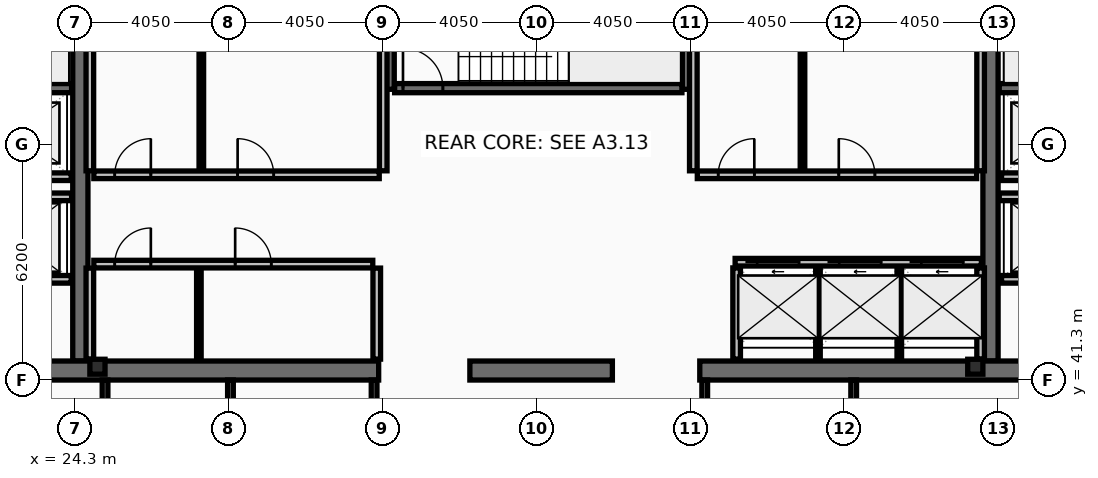
"""IFC4 building model, lengths in metres.
Left out: names, types, materials, properties, quantities, classifications, styles, units other than length and angle.
Written with IfcOpenShell. Run it as: python <this file> out.ifc"""

import sys

from ifc_helpers import new_model, si_unit, direction, frame, frame_2d, origin, origin_2d, place, context, subcontext, project, spatial, rectangle, i_section, extrude, element, fill, save


model = new_model("IFC4")
c1 = context("Model", 3, precision=1e-05, world=origin(), true_north=direction((0.0, 1.0)))
c2 = subcontext(c1, "Body", "Model", "MODEL_VIEW")
j1 = project(units=[si_unit("LENGTHUNIT", "METRE"), si_unit("PLANEANGLEUNIT", "RADIAN")], contexts=[c1])
p1 = place(None, origin())
s1 = spatial("IfcSite", under=j1, at=p1, CompositionType="ELEMENT")
p2 = place(p1, origin())
s2 = spatial("IfcBuilding", under=s1, at=p2, CompositionType="ELEMENT")
p3 = place(p2, frame((0.0, 0.0, 273.4)))
s3 = spatial("IfcBuildingStorey", under=s2, at=p3, CompositionType="ELEMENT", Elevation=273.4)
for number, where, z_axis, x_axis in (
    (1, (24.45, 41.8, 0.0), (0.0, 0.0, 1.0), (0.0, 1.0, 0.0)),
    (2, (48.4, 41.8, 0.0), (0.0, 0.0, 1.0), (0.0, 1.0, 0.0)),
):
    element("IfcWall", number, at=place(p3, frame(where, z_axis=z_axis, x_axis=x_axis)), inside=s3, PredefinedType="SHEAR", context=c2, shape_type="SweptSolid", body=[
        extrude(rectangle(XDim=11.4, YDim=0.4, at=frame_2d((5.7, 0.0))), origin(), (0.0, 0.0, 1.0), 3.44),
    ])
p4 = place(p3, frame((32.3, 41.55, 0.0), z_axis=(0.0, 0.0, 1.0), x_axis=(-1.0, 0.0, 0.0)))
e3 = element("IfcWall", 3, at=p4, inside=s3, PredefinedType="SHEAR", context=c2, shape_type="SweptSolid", body=[
    extrude(rectangle(XDim=11.45, YDim=0.5, at=frame_2d((5.725, 0.0))), origin(), (0.0, 0.0, 1.0), 3.44),
])
p5 = place(p3, frame((38.45, 41.55, 0.0), z_axis=(0.0, 0.0, 1.0), x_axis=(-1.0, 0.0, 0.0)))
e4 = element("IfcWall", 4, at=p5, inside=s3, PredefinedType="SHEAR", context=c2, shape_type="SweptSolid", body=[
    extrude(rectangle(XDim=3.75, YDim=0.5, at=frame_2d((1.875, 0.0))), origin(), (0.0, 0.0, 1.0), 3.44),
])
p6 = place(p3, frame((52.05, 41.55, 0.0), z_axis=(0.0, 0.0, 1.0), x_axis=(-1.0, 0.0, 0.0)))
e5 = element("IfcWall", 5, at=p6, inside=s3, PredefinedType="SHEAR", context=c2, shape_type="SweptSolid", body=[
    extrude(rectangle(XDim=11.3, YDim=0.5, at=frame_2d((5.65, 0.0))), origin(), (0.0, 0.0, 1.0), 3.44),
])
for number, where, z_axis, x_axis in (
    (6, (32.58, 48.95, 0.0), (0.0, 0.0, 1.0), (0.0, 1.0, 0.0)),
    (7, (40.42, 48.95, 0.0), (0.0, 0.0, 1.0), (0.0, 1.0, 0.0)),
):
    element("IfcWall", number, at=place(p3, frame(where, z_axis=z_axis, x_axis=x_axis)), inside=s3, PredefinedType="SHEAR", context=c2, shape_type="SweptSolid", body=[
        extrude(rectangle(XDim=4.25, YDim=0.26, at=frame_2d((2.125, 0.0))), origin(), (0.0, 0.0, 1.0), 3.44),
    ])
p7 = place(p3, frame((16.7, 48.98, 0.0), z_axis=(0.0, 0.0, 1.0), x_axis=(1.0, 0.0, 0.0)))
e8 = element("IfcWall", 8, at=p7, inside=s3, PredefinedType="SHEAR", context=c2, shape_type="SweptSolid", body=[
    extrude(rectangle(XDim=7.52, YDim=0.24, at=frame_2d((3.76, 0.0))), origin(), (0.0, 0.0, 1.0), 3.44),
])
p8 = place(p7, frame((0.22, 0.0, 0.0)))
e9 = element("IfcOpeningElement", 9, at=p8, cuts=e8, PredefinedType="OPENING", context=c2, shape_type="SweptSolid", body=[
    extrude(rectangle(XDim=1.05, YDim=2.15, at=frame_2d((0.525, 1.075))), frame((0.0, 0.13, 0.0), z_axis=(0.0, -1.0, 0.0), x_axis=(1.0, 0.0, 0.0)), (0.0, 0.0, 1.0), 0.26),
])
p9 = place(p3, frame((48.63, 48.98, 0.0), z_axis=(0.0, 0.0, 1.0), x_axis=(1.0, 0.0, 0.0)))
e10 = element("IfcWall", 10, at=p9, inside=s3, PredefinedType="SHEAR", context=c2, shape_type="SweptSolid", body=[
    extrude(rectangle(XDim=7.57, YDim=0.24, at=frame_2d((3.785, 0.0))), origin(), (0.0, 0.0, 1.0), 3.44),
])
p10 = place(p9, frame((6.3, 0.0, 0.0)))
e11 = element("IfcOpeningElement", 11, at=p10, cuts=e10, PredefinedType="OPENING", context=c2, shape_type="SweptSolid", body=[
    extrude(rectangle(XDim=1.05, YDim=2.15, at=frame_2d((0.525, 1.075))), frame((0.0, 0.13, 0.0), z_axis=(0.0, -1.0, 0.0), x_axis=(1.0, 0.0, 0.0)), (0.0, 0.0, 1.0), 0.26),
])
p11 = place(p3, frame((32.72, 48.98, 0.0), z_axis=(0.0, 0.0, 1.0), x_axis=(1.0, 0.0, 0.0)))
e12 = element("IfcWall", 12, at=p11, inside=s3, PredefinedType="SHEAR", context=c2, shape_type="SweptSolid", body=[
    extrude(rectangle(XDim=7.56, YDim=0.24, at=frame_2d((3.78, 0.0))), origin(), (0.0, 0.0, 1.0), 3.44),
])
p12 = place(p11, frame((0.22, 0.0, 0.0)))
e13 = element("IfcOpeningElement", 13, at=p12, cuts=e12, PredefinedType="OPENING", context=c2, shape_type="SweptSolid", body=[
    extrude(rectangle(XDim=1.05, YDim=2.15, at=frame_2d((0.525, 1.075))), frame((0.0, 0.13, 0.0), z_axis=(0.0, -1.0, 0.0), x_axis=(1.0, 0.0, 0.0)), (0.0, 0.0, 1.0), 0.26),
])
for number, where, z_axis, x_axis in (
    (14, (24.9, 41.65, 0.0), (0.0, 0.0, 1.0), (1.0, 0.0, 0.0)),
    (15, (48.0, 41.65, 0.0), (0.0, 0.0, 1.0), (1.0, 0.0, 0.0)),
):
    element("IfcColumn", number, at=place(p3, frame(where, z_axis=z_axis, x_axis=x_axis)), inside=s3, PredefinedType="COLUMN", context=c2, shape_type="SweptSolid", body=[
        extrude(i_section(OverallWidth=0.399, OverallDepth=0.393, WebThickness=0.023, FlangeThickness=0.037, at=origin_2d()), origin(), (0.0, 0.0, 1.0), 3.6),
    ])
p13 = place(p3, frame((41.68, 44.4, 0.0), z_axis=(0.0, 0.0, 1.0), x_axis=(1.0, 0.0, 0.0)))
e16 = element("IfcWall", 16, at=p13, inside=s3, PredefinedType="PARTITIONING", context=c2, shape_type="SweptSolid", body=[
    extrude(rectangle(XDim=6.48, YDim=0.2, at=frame_2d((3.24, 0.0))), origin(), (0.0, 0.0, 1.0), 3.44),
])
p14 = place(p13, frame((0.58, 0.0, 0.0)))
e17 = element("IfcOpeningElement", 17, at=p14, cuts=e16, PredefinedType="OPENING", context=c2, shape_type="SweptSolid", body=[
    extrude(rectangle(XDim=1.1, YDim=2.18, at=frame_2d((0.55, 1.09))), frame((0.0, 0.11, 0.0), z_axis=(0.0, -1.0, 0.0), x_axis=(1.0, 0.0, 0.0)), (0.0, 0.0, 1.0), 0.22),
])
p15 = place(p13, frame((2.74, 0.0, 0.0)))
e18 = element("IfcOpeningElement", 18, at=p15, cuts=e16, PredefinedType="OPENING", context=c2, shape_type="SweptSolid", body=[
    extrude(rectangle(XDim=1.1, YDim=2.18, at=frame_2d((0.55, 1.09))), frame((0.0, 0.11, 0.0), z_axis=(0.0, -1.0, 0.0), x_axis=(1.0, 0.0, 0.0)), (0.0, 0.0, 1.0), 0.22),
])
p16 = place(p13, frame((4.9, 0.0, 0.0)))
e19 = element("IfcOpeningElement", 19, at=p16, cuts=e16, PredefinedType="OPENING", context=c2, shape_type="SweptSolid", body=[
    extrude(rectangle(XDim=1.1, YDim=2.18, at=frame_2d((0.55, 1.09))), frame((0.0, 0.11, 0.0), z_axis=(0.0, -1.0, 0.0), x_axis=(1.0, 0.0, 0.0)), (0.0, 0.0, 1.0), 0.22),
])
p17 = place(p3, frame((51.61, 43.95, 0.0), z_axis=(0.0, 0.0, 1.0), x_axis=(-1.0, 0.0, 0.0)))
e20 = element("IfcWall", 20, at=p17, inside=s3, PredefinedType="PARTITIONING", context=c2, shape_type="SweptSolid", body=[
    extrude(rectangle(XDim=2.92, YDim=0.2, at=frame_2d((1.46, 0.0))), origin(), (0.0, 0.0, 1.0), 3.44),
])
p18 = place(p17, frame((0.81, 0.0, 0.0)))
e21 = element("IfcOpeningElement", 21, at=p18, cuts=e20, PredefinedType="OPENING", context=c2, shape_type="SweptSolid", body=[
    extrude(rectangle(XDim=1.3, YDim=2.18, at=frame_2d((0.65, 1.09))), frame((0.0, 0.11, 0.0), z_axis=(0.0, -1.0, 0.0), x_axis=(1.0, 0.0, 0.0)), (0.0, 0.0, 1.0), 0.22),
])
p19 = place(p3, frame((24.21, 43.95, 0.0), z_axis=(0.0, 0.0, 1.0), x_axis=(-1.0, 0.0, 0.0)))
e22 = element("IfcWall", 22, at=p19, inside=s3, PredefinedType="PARTITIONING", context=c2, shape_type="SweptSolid", body=[
    extrude(rectangle(XDim=2.97, YDim=0.2, at=frame_2d((1.485, 0.0))), origin(), (0.0, 0.0, 1.0), 3.44),
])
p20 = place(p19, frame((0.86, 0.0, 0.0)))
e23 = element("IfcOpeningElement", 23, at=p20, cuts=e22, PredefinedType="OPENING", context=c2, shape_type="SweptSolid", body=[
    extrude(rectangle(XDim=1.3, YDim=2.18, at=frame_2d((0.65, 1.09))), frame((0.0, 0.11, 0.0), z_axis=(0.0, -1.0, 0.0), x_axis=(1.0, 0.0, 0.0)), (0.0, 0.0, 1.0), 0.22),
])
p21 = place(p3, frame((51.61, 46.65, 0.0), z_axis=(0.0, 0.0, 1.0), x_axis=(-1.0, 0.0, 0.0)))
e24 = element("IfcWall", 24, at=p21, inside=s3, PredefinedType="PARTITIONING", context=c2, shape_type="SweptSolid", body=[
    extrude(rectangle(XDim=2.92, YDim=0.2, at=frame_2d((1.46, 0.0))), origin(), (0.0, 0.0, 1.0), 3.44),
])
p22 = place(p21, frame((0.86, 0.0, 0.0)))
e25 = element("IfcOpeningElement", 25, at=p22, cuts=e24, PredefinedType="OPENING", context=c2, shape_type="SweptSolid", body=[
    extrude(rectangle(XDim=1.2, YDim=2.18, at=frame_2d((0.6, 1.09))), frame((0.0, 0.11, 0.0), z_axis=(0.0, -1.0, 0.0), x_axis=(1.0, 0.0, 0.0)), (0.0, 0.0, 1.0), 0.22),
])
p23 = place(p3, frame((24.21, 46.65, 0.0), z_axis=(0.0, 0.0, 1.0), x_axis=(-1.0, 0.0, 0.0)))
e26 = element("IfcWall", 26, at=p23, inside=s3, PredefinedType="PARTITIONING", context=c2, shape_type="SweptSolid", body=[
    extrude(rectangle(XDim=2.97, YDim=0.2, at=frame_2d((1.485, 0.0))), origin(), (0.0, 0.0, 1.0), 3.44),
])
p24 = place(p23, frame((0.91, 0.0, 0.0)))
e27 = element("IfcOpeningElement", 27, at=p24, cuts=e26, PredefinedType="OPENING", context=c2, shape_type="SweptSolid", body=[
    extrude(rectangle(XDim=1.2, YDim=2.18, at=frame_2d((0.6, 1.09))), frame((0.0, 0.11, 0.0), z_axis=(0.0, -1.0, 0.0), x_axis=(1.0, 0.0, 0.0)), (0.0, 0.0, 1.0), 0.22),
])
p25 = place(p3, frame((21.2, 46.12, 0.0), z_axis=(0.0, 0.0, 1.0), x_axis=(1.0, 0.0, 0.0)))
e28 = element("IfcWall", 28, at=p25, inside=s3, PredefinedType="PARTITIONING", context=c2, shape_type="SweptSolid", body=[
    extrude(rectangle(XDim=3.02, YDim=0.2, at=frame_2d((1.51, 0.0))), origin(), (0.0, 0.0, 1.0), 3.44),
])
p26 = place(p3, frame((48.63, 46.12, 0.0), z_axis=(0.0, 0.0, 1.0), x_axis=(1.0, 0.0, 0.0)))
e29 = element("IfcWall", 29, at=p26, inside=s3, PredefinedType="PARTITIONING", context=c2, shape_type="SweptSolid", body=[
    extrude(rectangle(XDim=3.07, YDim=0.2, at=frame_2d((1.535, 0.0))), origin(), (0.0, 0.0, 1.0), 3.44),
])
for number, where, z_axis, x_axis in (
    (30, (24.7, 46.805, 0.0), (0.0, 0.0, 1.0), (0.0, 1.0, 0.0)),
    (31, (32.42, 46.805, 0.0), (0.0, 0.0, 1.0), (0.0, 1.0, 0.0)),
):
    element("IfcWall", number, at=place(p3, frame(where, z_axis=z_axis, x_axis=x_axis)), inside=s3, PredefinedType="PARTITIONING", context=c2, shape_type="SweptSolid", body=[
        extrude(rectangle(XDim=5.99, YDim=0.2, at=frame_2d((2.995, 0.0))), origin(), (0.0, 0.0, 1.0), 3.44),
    ])
p27 = place(p3, frame((27.634, 46.805, 0.0), z_axis=(0.0, 0.0, 1.0), x_axis=(0.0, 1.0, 0.0)))
e32 = element("IfcWall", 32, at=p27, inside=s3, PredefinedType="PARTITIONING", context=c2, shape_type="SweptSolid", body=[
    extrude(rectangle(XDim=5.99, YDim=0.12, at=frame_2d((2.995, 0.0))), origin(), (0.0, 0.0, 1.0), 3.44),
])
p28 = place(p3, frame((24.805, 46.7, 0.0), z_axis=(0.0, 0.0, 1.0), x_axis=(1.0, 0.0, 0.0)))
e33 = element("IfcWall", 33, at=p28, inside=s3, PredefinedType="PARTITIONING", context=c2, shape_type="SweptSolid", body=[
    extrude(rectangle(XDim=7.51, YDim=0.2, at=frame_2d((3.755, 0.0))), origin(), (0.0, 0.0, 1.0), 3.44),
])
p29 = place(p28, frame((0.55, 0.0, 0.0)))
e34 = element("IfcOpeningElement", 34, at=p29, cuts=e33, PredefinedType="OPENING", context=c2, shape_type="SweptSolid", body=[
    extrude(rectangle(XDim=0.95, YDim=2.1, at=frame_2d((0.475, 1.05))), frame((0.0, 0.11, 0.0), z_axis=(0.0, -1.0, 0.0), x_axis=(1.0, 0.0, 0.0)), (0.0, 0.0, 1.0), 0.22),
])
p30 = place(p28, frame((3.784, 0.0, 0.0)))
e35 = element("IfcOpeningElement", 35, at=p30, cuts=e33, PredefinedType="OPENING", context=c2, shape_type="SweptSolid", body=[
    extrude(rectangle(XDim=0.95, YDim=2.1, at=frame_2d((0.475, 1.05))), frame((0.0, 0.11, 0.0), z_axis=(0.0, -1.0, 0.0), x_axis=(1.0, 0.0, 0.0)), (0.0, 0.0, 1.0), 0.22),
])
for number, where, z_axis, x_axis in (
    (36, (24.7, 41.85, 0.0), (0.0, 0.0, 1.0), (0.0, 1.0, 0.0)),
    (37, (32.25, 41.85, 0.0), (0.0, 0.0, 1.0), (0.0, 1.0, 0.0)),
):
    element("IfcWall", number, at=place(p3, frame(where, z_axis=z_axis, x_axis=x_axis)), inside=s3, PredefinedType="PARTITIONING", context=c2, shape_type="SweptSolid", body=[
        extrude(rectangle(XDim=2.395, YDim=0.2, at=frame_2d((1.198, 0.0))), origin(), (0.0, 0.0, 1.0), 3.44),
    ])
p31 = place(p3, frame((27.569, 41.85, 0.0), z_axis=(0.0, 0.0, 1.0), x_axis=(0.0, 1.0, 0.0)))
e38 = element("IfcWall", 38, at=p31, inside=s3, PredefinedType="PARTITIONING", context=c2, shape_type="SweptSolid", body=[
    extrude(rectangle(XDim=2.395, YDim=0.12, at=frame_2d((1.198, 0.0))), origin(), (0.0, 0.0, 1.0), 3.44),
])
p32 = place(p3, frame((24.805, 44.35, 0.0), z_axis=(0.0, 0.0, 1.0), x_axis=(1.0, 0.0, 0.0)))
e39 = element("IfcWall", 39, at=p32, inside=s3, PredefinedType="PARTITIONING", context=c2, shape_type="SweptSolid", body=[
    extrude(rectangle(XDim=7.34, YDim=0.2, at=frame_2d((3.67, 0.0))), origin(), (0.0, 0.0, 1.0), 3.44),
])
p33 = place(p32, frame((0.55, 0.0, 0.0)))
e40 = element("IfcOpeningElement", 40, at=p33, cuts=e39, PredefinedType="OPENING", context=c2, shape_type="SweptSolid", body=[
    extrude(rectangle(XDim=0.95, YDim=2.1, at=frame_2d((0.475, 1.05))), frame((0.0, 0.11, 0.0), z_axis=(0.0, -1.0, 0.0), x_axis=(1.0, 0.0, 0.0)), (0.0, 0.0, 1.0), 0.22),
])
p34 = place(p32, frame((3.719, 0.0, 0.0)))
e41 = element("IfcOpeningElement", 41, at=p34, cuts=e39, PredefinedType="OPENING", context=c2, shape_type="SweptSolid", body=[
    extrude(rectangle(XDim=0.95, YDim=2.1, at=frame_2d((0.475, 1.05))), frame((0.0, 0.11, 0.0), z_axis=(0.0, -1.0, 0.0), x_axis=(1.0, 0.0, 0.0)), (0.0, 0.0, 1.0), 0.22),
])
for number, where, z_axis, x_axis in (
    (42, (40.58, 46.805, 0.0), (0.0, 0.0, 1.0), (0.0, 1.0, 0.0)),
    (43, (48.14, 46.805, 0.0), (0.0, 0.0, 1.0), (0.0, 1.0, 0.0)),
):
    element("IfcWall", number, at=place(p3, frame(where, z_axis=z_axis, x_axis=x_axis)), inside=s3, PredefinedType="PARTITIONING", context=c2, shape_type="SweptSolid", body=[
        extrude(rectangle(XDim=5.99, YDim=0.2, at=frame_2d((2.995, 0.0))), origin(), (0.0, 0.0, 1.0), 3.44),
    ])
p35 = place(p3, frame((43.453, 46.805, 0.0), z_axis=(0.0, 0.0, 1.0), x_axis=(0.0, 1.0, 0.0)))
e44 = element("IfcWall", 44, at=p35, inside=s3, PredefinedType="PARTITIONING", context=c2, shape_type="SweptSolid", body=[
    extrude(rectangle(XDim=5.99, YDim=0.12, at=frame_2d((2.995, 0.0))), origin(), (0.0, 0.0, 1.0), 3.44),
])
p36 = place(p3, frame((40.685, 46.7, 0.0), z_axis=(0.0, 0.0, 1.0), x_axis=(1.0, 0.0, 0.0)))
e45 = element("IfcWall", 45, at=p36, inside=s3, PredefinedType="PARTITIONING", context=c2, shape_type="SweptSolid", body=[
    extrude(rectangle(XDim=7.35, YDim=0.2, at=frame_2d((3.675, 0.0))), origin(), (0.0, 0.0, 1.0), 3.44),
])
p37 = place(p36, frame((0.55, 0.0, 0.0)))
e46 = element("IfcOpeningElement", 46, at=p37, cuts=e45, PredefinedType="OPENING", context=c2, shape_type="SweptSolid", body=[
    extrude(rectangle(XDim=0.95, YDim=2.1, at=frame_2d((0.475, 1.05))), frame((0.0, 0.11, 0.0), z_axis=(0.0, -1.0, 0.0), x_axis=(1.0, 0.0, 0.0)), (0.0, 0.0, 1.0), 0.22),
])
p38 = place(p36, frame((3.723, 0.0, 0.0)))
e47 = element("IfcOpeningElement", 47, at=p38, cuts=e45, PredefinedType="OPENING", context=c2, shape_type="SweptSolid", body=[
    extrude(rectangle(XDim=0.95, YDim=2.1, at=frame_2d((0.475, 1.05))), frame((0.0, 0.11, 0.0), z_axis=(0.0, -1.0, 0.0), x_axis=(1.0, 0.0, 0.0)), (0.0, 0.0, 1.0), 0.22),
])
for number, where, z_axis, x_axis in (
    (48, (41.72, 41.85, 0.0), (0.0, 0.0, 1.0), (0.0, 1.0, 0.0)),
    (49, (48.14, 41.85, 0.0), (0.0, 0.0, 1.0), (0.0, 1.0, 0.0)),
):
    element("IfcWall", number, at=place(p3, frame(where, z_axis=z_axis, x_axis=x_axis)), inside=s3, PredefinedType="PARTITIONING", context=c2, shape_type="SweptSolid", body=[
        extrude(rectangle(XDim=2.4, YDim=0.2, at=frame_2d((1.2, 0.0))), origin(), (0.0, 0.0, 1.0), 3.44),
    ])
for number, where, z_axis, x_axis in (
    (50, (43.86, 41.85, 0.0), (0.0, 0.0, 1.0), (0.0, 1.0, 0.0)),
    (51, (46.0, 41.85, 0.0), (0.0, 0.0, 1.0), (0.0, 1.0, 0.0)),
):
    element("IfcWall", number, at=place(p3, frame(where, z_axis=z_axis, x_axis=x_axis)), inside=s3, PredefinedType="PARTITIONING", context=c2, shape_type="SweptSolid", body=[
        extrude(rectangle(XDim=2.4, YDim=0.12, at=frame_2d((1.2, 0.0))), origin(), (0.0, 0.0, 1.0), 3.44),
    ])
p39 = place(p3, frame((25.1, 38.28, 0.0), z_axis=(0.0, 0.0, 1.0), x_axis=(0.0, 1.0, 0.0)))
e52 = element("IfcWall", 52, at=p39, inside=s3, PredefinedType="PARTITIONING", context=c2, shape_type="SweptSolid", body=[
    extrude(rectangle(XDim=3.02, YDim=0.15, at=frame_2d((1.51, 0.0))), origin(), (0.0, 0.0, 1.0), 2.78),
])
for number, where, z_axis, x_axis in (
    (53, (28.4, 38.28, 0.0), (0.0, 0.0, 1.0), (0.0, 1.0, 0.0)),
    (54, (32.18, 38.28, 0.0), (0.0, 0.0, 1.0), (0.0, 1.0, 0.0)),
    (55, (40.88, 38.28, 0.0), (0.0, 0.0, 1.0), (0.0, 1.0, 0.0)),
    (56, (44.8, 38.28, 0.0), (0.0, 0.0, 1.0), (0.0, 1.0, 0.0)),
):
    element("IfcWall", number, at=place(p3, frame(where, z_axis=z_axis, x_axis=x_axis)), inside=s3, PredefinedType="PARTITIONING", context=c2, shape_type="SweptSolid", body=[
        extrude(rectangle(XDim=3.02, YDim=0.15, at=frame_2d((1.51, 0.0))), origin(), (0.0, 0.0, 1.0), 3.44),
    ])
p40 = place(p12, origin())
e57 = element("IfcDoor", 57, at=p40, inside=s3, OperationType="SINGLE_SWING_LEFT", PredefinedType="DOOR", context=c2, shape_type="SweptSolid", body=[
    extrude(rectangle(XDim=1.05, YDim=2.15, at=frame_2d((0.525, 1.075))), frame((0.0, 0.025, 0.0), z_axis=(0.0, -1.0, 0.0), x_axis=(1.0, 0.0, 0.0)), (0.0, 0.0, 1.0), 0.05),
])
fill(e13, e57)
p41 = place(p14, origin())
e58 = element("IfcDoor", 58, at=p41, inside=s3, OperationType="SLIDING_TO_LEFT", PredefinedType="DOOR", context=c2, shape_type="SweptSolid", body=[
    extrude(rectangle(XDim=1.1, YDim=2.18, at=frame_2d((0.55, 1.09))), frame((0.0, 0.025, 0.0), z_axis=(0.0, -1.0, 0.0), x_axis=(1.0, 0.0, 0.0)), (0.0, 0.0, 1.0), 0.05),
])
fill(e17, e58)
p42 = place(p15, origin())
e59 = element("IfcDoor", 59, at=p42, inside=s3, OperationType="SLIDING_TO_LEFT", PredefinedType="DOOR", context=c2, shape_type="SweptSolid", body=[
    extrude(rectangle(XDim=1.1, YDim=2.18, at=frame_2d((0.55, 1.09))), frame((0.0, 0.025, 0.0), z_axis=(0.0, -1.0, 0.0), x_axis=(1.0, 0.0, 0.0)), (0.0, 0.0, 1.0), 0.05),
])
fill(e18, e59)
p43 = place(p16, origin())
e60 = element("IfcDoor", 60, at=p43, inside=s3, OperationType="SLIDING_TO_LEFT", PredefinedType="DOOR", context=c2, shape_type="SweptSolid", body=[
    extrude(rectangle(XDim=1.1, YDim=2.18, at=frame_2d((0.55, 1.09))), frame((0.0, 0.025, 0.0), z_axis=(0.0, -1.0, 0.0), x_axis=(1.0, 0.0, 0.0)), (0.0, 0.0, 1.0), 0.05),
])
fill(e19, e60)
p44 = place(p29, origin())
e61 = element("IfcDoor", 61, at=p44, inside=s3, OperationType="SINGLE_SWING_RIGHT", PredefinedType="DOOR", context=c2, shape_type="SweptSolid", body=[
    extrude(rectangle(XDim=0.95, YDim=2.1, at=frame_2d((0.475, 1.05))), frame((0.0, 0.025, 0.0), z_axis=(0.0, -1.0, 0.0), x_axis=(1.0, 0.0, 0.0)), (0.0, 0.0, 1.0), 0.05),
])
fill(e34, e61)
p45 = place(p30, origin())
e62 = element("IfcDoor", 62, at=p45, inside=s3, OperationType="SINGLE_SWING_LEFT", PredefinedType="DOOR", context=c2, shape_type="SweptSolid", body=[
    extrude(rectangle(XDim=0.95, YDim=2.1, at=frame_2d((0.475, 1.05))), frame((0.0, 0.025, 0.0), z_axis=(0.0, -1.0, 0.0), x_axis=(1.0, 0.0, 0.0)), (0.0, 0.0, 1.0), 0.05),
])
fill(e35, e62)
p46 = place(p33, origin())
e63 = element("IfcDoor", 63, at=p46, inside=s3, OperationType="SINGLE_SWING_RIGHT", PredefinedType="DOOR", context=c2, shape_type="SweptSolid", body=[
    extrude(rectangle(XDim=0.95, YDim=2.1, at=frame_2d((0.475, 1.05))), frame((0.0, 0.025, 0.0), z_axis=(0.0, -1.0, 0.0), x_axis=(1.0, 0.0, 0.0)), (0.0, 0.0, 1.0), 0.05),
])
fill(e40, e63)
p47 = place(p34, origin())
e64 = element("IfcDoor", 64, at=p47, inside=s3, OperationType="SINGLE_SWING_LEFT", PredefinedType="DOOR", context=c2, shape_type="SweptSolid", body=[
    extrude(rectangle(XDim=0.95, YDim=2.1, at=frame_2d((0.475, 1.05))), frame((0.0, 0.025, 0.0), z_axis=(0.0, -1.0, 0.0), x_axis=(1.0, 0.0, 0.0)), (0.0, 0.0, 1.0), 0.05),
])
fill(e41, e64)
p48 = place(p37, origin())
e65 = element("IfcDoor", 65, at=p48, inside=s3, OperationType="SINGLE_SWING_RIGHT", PredefinedType="DOOR", context=c2, shape_type="SweptSolid", body=[
    extrude(rectangle(XDim=0.95, YDim=2.1, at=frame_2d((0.475, 1.05))), frame((0.0, 0.025, 0.0), z_axis=(0.0, -1.0, 0.0), x_axis=(1.0, 0.0, 0.0)), (0.0, 0.0, 1.0), 0.05),
])
fill(e46, e65)
p49 = place(p38, origin())
e66 = element("IfcDoor", 66, at=p49, inside=s3, OperationType="SINGLE_SWING_LEFT", PredefinedType="DOOR", context=c2, shape_type="SweptSolid", body=[
    extrude(rectangle(XDim=0.95, YDim=2.1, at=frame_2d((0.475, 1.05))), frame((0.0, 0.025, 0.0), z_axis=(0.0, -1.0, 0.0), x_axis=(1.0, 0.0, 0.0)), (0.0, 0.0, 1.0), 0.05),
])
fill(e47, e66)
save(model, sys.argv[1])
